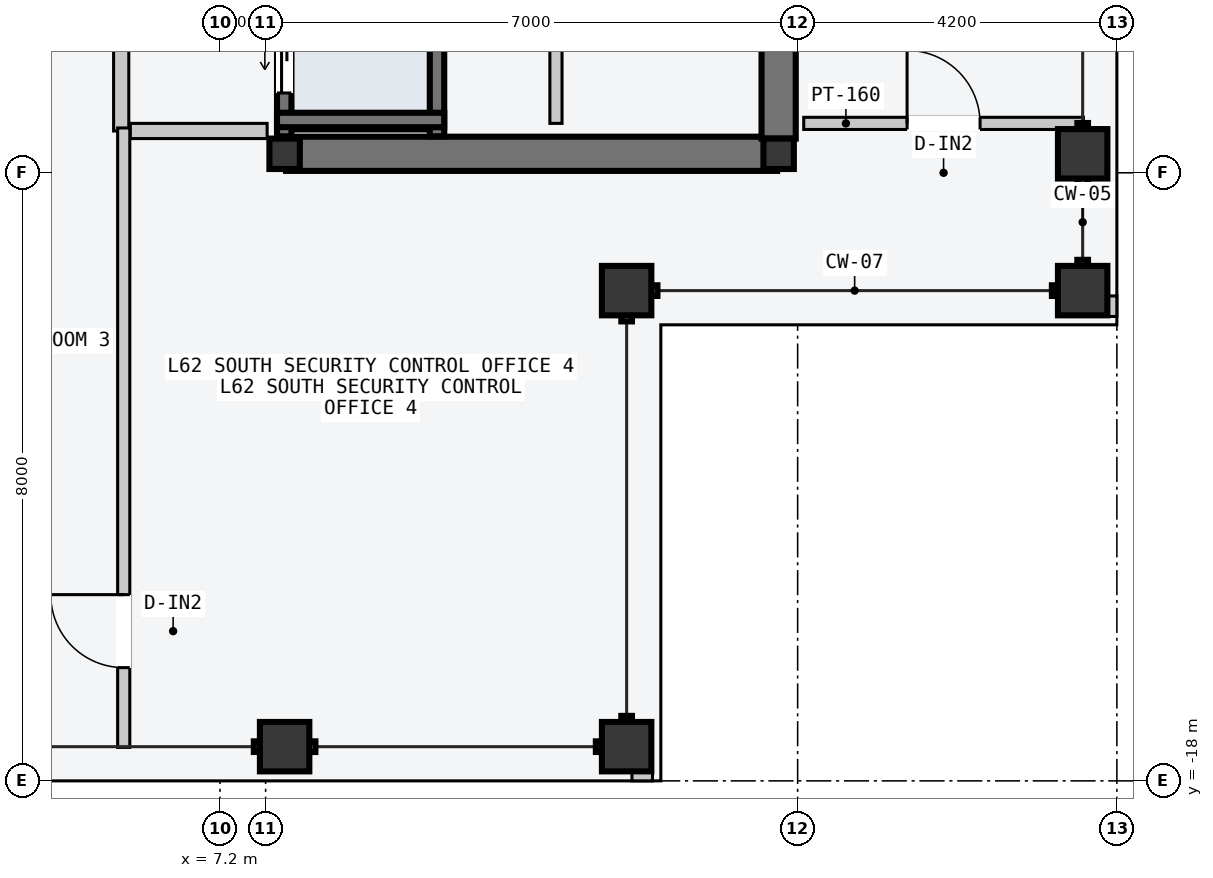
"""IFC4 building model, lengths in metres.
Left out: names, types, materials, properties, quantities, classifications, styles, units other than length and angle.
Written with IfcOpenShell. Run it as: python <this file> out.ifc"""

import sys

from ifc_helpers import new_model, si_unit, direction, frame, frame_2d, origin, origin_2d, place, context, subcontext, project, spatial, rectangle, hollow_rectangle, i_section, extrude, element, fill, save


model = new_model("IFC4")
c1 = context("Model", 3, precision=1e-05, world=origin(), true_north=direction((0.0, 1.0)))
c2 = subcontext(c1, "Body", "Model", "MODEL_VIEW")
j1 = project(units=[si_unit("LENGTHUNIT", "METRE"), si_unit("PLANEANGLEUNIT", "RADIAN")], contexts=[c1])
p1 = place(None, origin())
s1 = spatial("IfcSite", under=j1, at=p1, CompositionType="ELEMENT")
p2 = place(p1, origin())
s2 = spatial("IfcBuilding", under=s1, at=p2, CompositionType="ELEMENT")
p3 = place(p2, frame((0.0, 0.0, 236.4)))
s3 = spatial("IfcBuildingStorey", under=s2, at=p3, CompositionType="ELEMENT", Elevation=236.4)
p4 = place(p3, frame((8.07, -9.75, -0.2), z_axis=(0.0, 0.0, 1.0), x_axis=(1.0, 0.0, 0.0)))
e1 = element("IfcWall", 1, at=p4, inside=s3, PredefinedType="SHEAR", context=c2, shape_type="SweptSolid", body=[
    extrude(rectangle(XDim=6.46, YDim=0.45, at=frame_2d((3.23, 0.0))), origin(), (0.0, 0.0, 1.0), 3.6),
])
p5 = place(p3, frame((14.55, -9.55, -0.2), z_axis=(0.0, 0.0, 1.0), x_axis=(0.0, 1.0, 0.0)))
e2 = element("IfcWall", 2, at=p5, inside=s3, PredefinedType="SHEAR", context=c2, shape_type="SweptSolid", body=[
    extrude(rectangle(XDim=9.35, YDim=0.45, at=frame_2d((4.675, 0.0))), origin(), (0.0, 0.0, 1.0), 3.6),
])
for number, where, z_axis, x_axis in (
    (3, (8.05, -9.75, 0.0), (0.0, 0.0, 1.0), (1.0, 0.0, 0.0)),
    (4, (14.55, -9.75, 0.0), (0.0, 0.0, 1.0), (1.0, 0.0, 0.0)),
):
    element("IfcColumn", number, at=place(p3, frame(where, z_axis=z_axis, x_axis=x_axis)), inside=s3, PredefinedType="COLUMN", context=c2, shape_type="SweptSolid", body=[
        extrude(i_section(OverallWidth=0.4, OverallDepth=0.4, WebThickness=0.013, FlangeThickness=0.021, at=origin_2d()), origin(), (0.0, 0.0, 1.0), 3.6),
    ])
for number, where, z_axis, x_axis in (
    (5, (8.05, -17.55, 0.0), (0.0, 0.0, 1.0), (1.0, 0.0, 0.0)),
    (6, (12.55, -17.55, 0.0), (0.0, 0.0, 1.0), (1.0, 0.0, 0.0)),
    (7, (18.55, -11.55, 0.0), (0.0, 0.0, 1.0), (0.0, 1.0, 0.0)),
    (8, (18.55, -9.75, 0.0), (0.0, 0.0, 1.0), (0.0, 1.0, 0.0)),
    (9, (12.55, -11.55, 0.0), (0.0, 0.0, 1.0), (1.0, 0.0, 0.0)),
):
    element("IfcColumn", number, at=place(p3, frame(where, z_axis=z_axis, x_axis=x_axis)), inside=s3, PredefinedType="COLUMN", context=c2, shape_type="SweptSolid", body=[
        extrude(hollow_rectangle(XDim=0.65, YDim=0.65, WallThickness=0.028, at=origin_2d()), origin(), (0.0, 0.0, 1.0), 3.6),
    ])
for number, where, z_axis, x_axis in (
    (10, (12.62, -17.89, 0.0), (0.0, 0.0, 1.0), (1.0, 0.0, 0.0)),
    (11, (18.89, -11.89, 0.0), (0.0, 0.0, 1.0), (0.0, 1.0, 0.0)),
):
    element("IfcWall", number, at=place(p3, frame(where, z_axis=z_axis, x_axis=x_axis)), inside=s3, PredefinedType="PARAPET", context=c2, shape_type="SweptSolid", body=[
        extrude(rectangle(XDim=0.27, YDim=0.22, at=frame_2d((0.135, 0.0))), origin(), (0.0, 0.0, 1.0), 1.2),
    ])
p6 = place(p3, frame((8.045, -9.52, -0.2), z_axis=(0.0, 0.0, 1.0), x_axis=(0.0, 1.0, 0.0)))
e12 = element("IfcWall", 12, at=p6, inside=s3, PredefinedType="SOLIDWALL", context=c2, shape_type="SweptSolid", body=[
    extrude(rectangle(XDim=2.12, YDim=0.19, at=frame_2d((1.06, 0.0))), origin(), (0.0, 0.0, 1.0), 3.6),
])
p7 = place(p6, frame((0.57, 0.0, 0.2)))
e13 = element("IfcOpeningElement", 13, at=p7, cuts=e12, PredefinedType="OPENING", context=c2, shape_type="SweptSolid", body=[
    extrude(rectangle(XDim=1.1, YDim=2.2, at=frame_2d((0.55, 1.1))), frame((0.0, 0.105, 0.0), z_axis=(0.0, -1.0, 0.0), x_axis=(1.0, 0.0, 0.0)), (0.0, 0.0, 1.0), 0.21),
])
p8 = place(p3, frame((10.055, -9.52, -0.2), z_axis=(0.0, 0.0, 1.0), x_axis=(0.0, 1.0, 0.0)))
e14 = element("IfcWall", 14, at=p8, inside=s3, PredefinedType="SOLIDWALL", context=c2, shape_type="SweptSolid", body=[
    extrude(rectangle(XDim=2.12, YDim=0.19, at=frame_2d((1.06, 0.0))), origin(), (0.0, 0.0, 1.0), 3.6),
])
p9 = place(p3, frame((7.95, -9.305, -0.2), z_axis=(0.0, 0.0, 1.0), x_axis=(1.0, 0.0, 0.0)))
e15 = element("IfcWall", 15, at=p9, inside=s3, PredefinedType="SOLIDWALL", context=c2, shape_type="SweptSolid", body=[
    extrude(rectangle(XDim=2.2, YDim=0.19, at=frame_2d((1.1, 0.0))), origin(), (0.0, 0.0, 1.0), 3.6),
])
p10 = place(p3, frame((5.9, -9.45, 0.0), z_axis=(0.0, 0.0, 1.0), x_axis=(0.0, 1.0, 0.0)))
e16 = element("IfcWall", 16, at=p10, inside=s3, PredefinedType="PARTITIONING", context=c2, shape_type="SweptSolid", body=[
    extrude(rectangle(XDim=10.5, YDim=0.2, at=frame_2d((5.25, 0.0))), origin(), (0.0, 0.0, 1.0), 3.4),
])
p11 = place(p10, frame((3.9, 0.0, 0.0)))
e17 = element("IfcOpeningElement", 17, at=p11, cuts=e16, PredefinedType="OPENING", context=c2, shape_type="SweptSolid", body=[
    extrude(rectangle(XDim=1.5, YDim=2.2, at=frame_2d((0.75, 1.1))), frame((0.0, 0.11, 0.0), z_axis=(0.0, -1.0, 0.0), x_axis=(1.0, 0.0, 0.0)), (0.0, 0.0, 1.0), 0.22),
])
p12 = place(p3, frame((6.02, -9.45, 0.0), z_axis=(0.0, 0.0, 1.0), x_axis=(1.0, 0.0, 0.0)))
e18 = element("IfcWall", 18, at=p12, inside=s3, PredefinedType="PARTITIONING", context=c2, shape_type="SweptSolid", body=[
    extrude(rectangle(XDim=1.8, YDim=0.2, at=frame_2d((0.9, 0.0))), origin(), (0.0, 0.0, 1.0), 3.4),
])
p13 = place(p3, frame((11.62, -9.35, 0.0), z_axis=(0.0, 0.0, 1.0), x_axis=(0.0, 1.0, 0.0)))
e19 = element("IfcWall", 19, at=p13, inside=s3, PredefinedType="PARTITIONING", context=c2, shape_type="SweptSolid", body=[
    extrude(rectangle(XDim=3.85, YDim=0.16, at=frame_2d((1.925, 0.0))), origin(), (0.0, 0.0, 1.0), 3.4),
])
p14 = place(p13, frame((1.475, 0.0, 0.0)))
e20 = element("IfcOpeningElement", 20, at=p14, cuts=e19, PredefinedType="OPENING", context=c2, shape_type="SweptSolid", body=[
    extrude(rectangle(XDim=0.9, YDim=2.15, at=frame_2d((0.45, 1.075))), frame((0.0, 0.09, 0.0), z_axis=(0.0, -1.0, 0.0), x_axis=(1.0, 0.0, 0.0)), (0.0, 0.0, 1.0), 0.18),
])
p15 = place(p3, frame((5.933, -17.56, 0.0), z_axis=(0.0, 0.0, 1.0), x_axis=(0.0, 1.0, 0.0)))
e21 = element("IfcWall", 21, at=p15, inside=s3, PredefinedType="PARTITIONING", context=c2, shape_type="SweptSolid", body=[
    extrude(rectangle(XDim=8.15, YDim=0.16, at=frame_2d((4.075, 0.0))), origin(), (0.0, 0.0, 1.0), 3.4),
])
p16 = place(p15, frame((1.05, 0.0, 0.0)))
e22 = element("IfcOpeningElement", 22, at=p16, cuts=e21, PredefinedType="OPENING", context=c2, shape_type="SweptSolid", body=[
    extrude(rectangle(XDim=0.96, YDim=2.18, at=frame_2d((0.48, 1.09))), frame((0.0, 0.09, 0.0), z_axis=(0.0, -1.0, 0.0), x_axis=(1.0, 0.0, 0.0)), (0.0, 0.0, 1.0), 0.18),
])
p17 = place(p3, frame((14.88, -9.35, 0.0), z_axis=(0.0, 0.0, 1.0), x_axis=(1.0, 0.0, 0.0)))
e23 = element("IfcWall", 23, at=p17, inside=s3, PredefinedType="PARTITIONING", context=c2, shape_type="SweptSolid", body=[
    extrude(rectangle(XDim=3.68, YDim=0.16, at=frame_2d((1.84, 0.0))), origin(), (0.0, 0.0, 1.0), 3.4),
])
p18 = place(p17, frame((1.36, 0.0, 0.0)))
e24 = element("IfcOpeningElement", 24, at=p18, cuts=e23, PredefinedType="OPENING", context=c2, shape_type="SweptSolid", body=[
    extrude(rectangle(XDim=0.96, YDim=2.18, at=frame_2d((0.48, 1.09))), frame((0.0, 0.09, 0.0), z_axis=(0.0, -1.0, 0.0), x_axis=(1.0, 0.0, 0.0)), (0.0, 0.0, 1.0), 0.18),
])
p19 = place(p7, origin())
e25 = element("IfcDoor", 25, at=p19, inside=s3, OperationType="SLIDING_TO_LEFT", PredefinedType="DOOR", context=c2, shape_type="SweptSolid", body=[
    extrude(rectangle(XDim=1.1, YDim=2.2, at=frame_2d((0.55, 1.1))), frame((0.0, 0.025, 0.0), z_axis=(0.0, -1.0, 0.0), x_axis=(1.0, 0.0, 0.0)), (0.0, 0.0, 1.0), 0.05),
])
fill(e13, e25)
p20 = place(p16, origin())
e26 = element("IfcDoor", 26, at=p20, inside=s3, OperationType="SINGLE_SWING_RIGHT", PredefinedType="DOOR", context=c2, shape_type="SweptSolid", body=[
    extrude(rectangle(XDim=0.96, YDim=2.18, at=frame_2d((0.48, 1.09))), frame((0.0, 0.025, 0.0), z_axis=(0.0, -1.0, 0.0), x_axis=(1.0, 0.0, 0.0)), (0.0, 0.0, 1.0), 0.05),
])
fill(e22, e26)
p21 = place(p18, origin())
e27 = element("IfcDoor", 27, at=p21, inside=s3, OperationType="SINGLE_SWING_LEFT", PredefinedType="DOOR", context=c2, shape_type="SweptSolid", body=[
    extrude(rectangle(XDim=0.96, YDim=2.18, at=frame_2d((0.48, 1.09))), frame((0.0, 0.025, 0.0), z_axis=(0.0, -1.0, 0.0), x_axis=(1.0, 0.0, 0.0)), (0.0, 0.0, 1.0), 0.05),
])
fill(e24, e27)
save(model, sys.argv[1])
